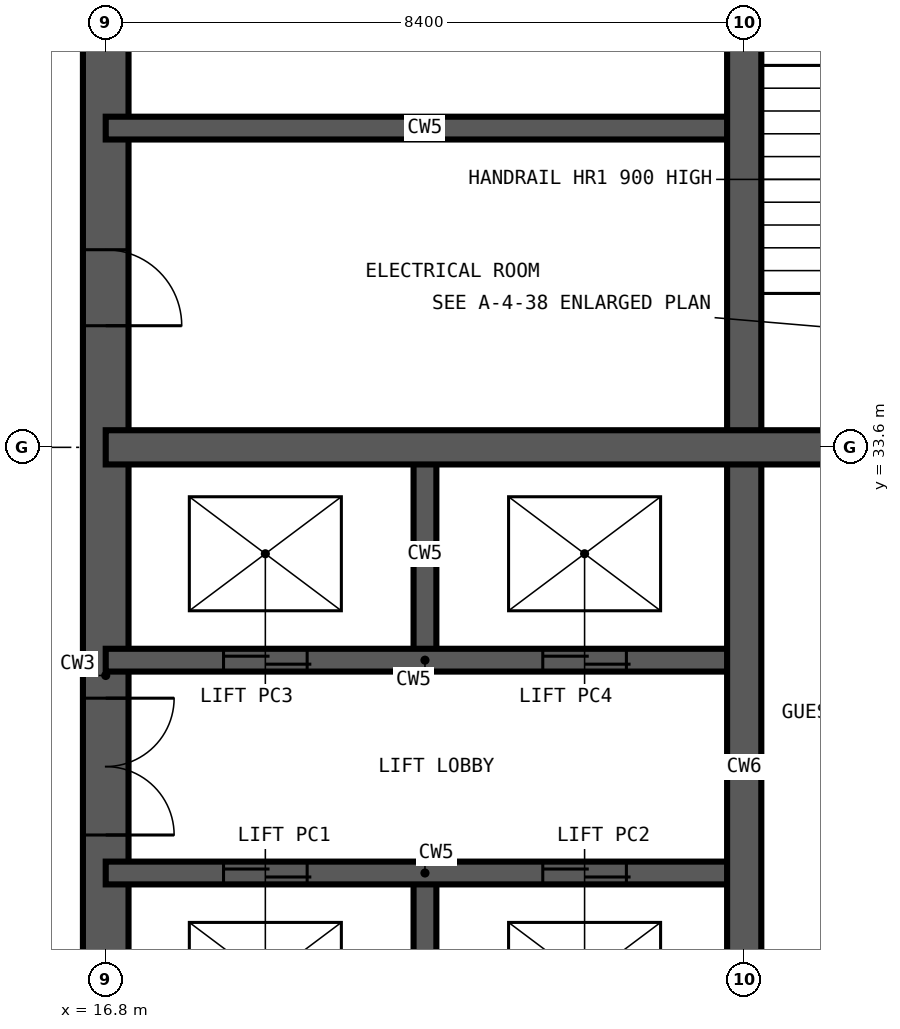
"""IFC4 building model, lengths in metres.
Left out: names, types, materials, properties, quantities, classifications, styles, units other than length and angle.
Written with IfcOpenShell. Run it as: python <this file> out.ifc"""

import sys

from ifc_helpers import new_model, si_unit, direction, frame, frame_2d, origin, place, context, subcontext, project, spatial, rectangle, extrude, element, fill, save


model = new_model("IFC4")
c1 = context("Model", 3, precision=1e-05, world=origin(), true_north=direction((0.0, 1.0)))
c2 = subcontext(c1, "Body", "Model", "MODEL_VIEW")
j1 = project(units=[si_unit("LENGTHUNIT", "METRE"), si_unit("PLANEANGLEUNIT", "RADIAN")], contexts=[c1])
p1 = place(None, origin())
s1 = spatial("IfcSite", under=j1, at=p1, CompositionType="ELEMENT")
p2 = place(p1, origin())
s2 = spatial("IfcBuilding", under=s1, at=p2, CompositionType="ELEMENT")
p3 = place(p2, frame((0.0, 0.0, 187.8)))
s3 = spatial("IfcBuildingStorey", under=s2, at=p3, CompositionType="ELEMENT", Elevation=187.8)
p4 = place(p3, frame((16.8, 41.7, -0.35), z_axis=(0.0, 0.0, 1.0), x_axis=(0.0, -1.0, 0.0)))
e1 = element("IfcWall", 1, at=p4, inside=s3, PredefinedType="SHEAR", context=c2, shape_type="SweptSolid", body=[
    extrude(rectangle(XDim=24.6, YDim=0.6, at=frame_2d((12.3, 0.0))), origin(), (0.0, 0.0, 1.0), 3.6),
])
p5 = place(p4, frame((11.4, 0.0, 0.35)))
e2 = element("IfcOpeningElement", 2, at=p5, cuts=e1, PredefinedType="OPENING", context=c2, shape_type="SweptSolid", body=[
    extrude(rectangle(XDim=1.8, YDim=2.2, at=frame_2d((0.9, 1.1))), frame((0.0, 0.31, 0.0), z_axis=(0.0, -1.0, 0.0), x_axis=(1.0, 0.0, 0.0)), (0.0, 0.0, 1.0), 0.62),
])
p6 = place(p4, frame((20.2, 0.0, 0.35)))
e3 = element("IfcOpeningElement", 3, at=p6, cuts=e1, PredefinedType="OPENING", context=c2, shape_type="SweptSolid", body=[
    extrude(rectangle(XDim=1.0, YDim=2.1, at=frame_2d((0.5, 1.05))), frame((0.0, 0.31, 0.0), z_axis=(0.0, -1.0, 0.0), x_axis=(1.0, 0.0, 0.0)), (0.0, 0.0, 1.0), 0.62),
])
p7 = place(p4, frame((5.5, 0.0, 0.35)))
e4 = element("IfcOpeningElement", 4, at=p7, cuts=e1, PredefinedType="OPENING", context=c2, shape_type="SweptSolid", body=[
    extrude(rectangle(XDim=1.0, YDim=2.1, at=frame_2d((0.5, 1.05))), frame((0.0, 0.31, 0.0), z_axis=(0.0, -1.0, 0.0), x_axis=(1.0, 0.0, 0.0)), (0.0, 0.0, 1.0), 0.62),
])
p8 = place(p3, frame((21.0, 22.4, -0.35), z_axis=(0.0, 0.0, 1.0), x_axis=(0.0, 1.0, 0.0)))
e5 = element("IfcWall", 5, at=p8, inside=s3, PredefinedType="SHEAR", context=c2, shape_type="SweptSolid", body=[
    extrude(rectangle(XDim=5.6, YDim=0.3, at=frame_2d((2.8, 0.0))), origin(), (0.0, 0.0, 1.0), 3.6),
])
p9 = place(p3, frame((21.0, 30.8, -0.35), z_axis=(0.0, 0.0, 1.0), x_axis=(0.0, 1.0, 0.0)))
e6 = element("IfcWall", 6, at=p9, inside=s3, PredefinedType="SHEAR", context=c2, shape_type="SweptSolid", body=[
    extrude(rectangle(XDim=2.8, YDim=0.3, at=frame_2d((1.4, 0.0))), origin(), (0.0, 0.0, 1.0), 3.6),
])
p10 = place(p3, frame((16.8, 28.0, -0.35), z_axis=(0.0, 0.0, 1.0), x_axis=(1.0, 0.0, 0.0)))
e7 = element("IfcWall", 7, at=p10, inside=s3, PredefinedType="SHEAR", context=c2, shape_type="SweptSolid", body=[
    extrude(rectangle(XDim=8.4, YDim=0.3, at=frame_2d((4.2, 0.0))), origin(), (0.0, 0.0, 1.0), 3.6),
])
p11 = place(p10, frame((1.55, 0.0, 0.35)))
e8 = element("IfcOpeningElement", 8, at=p11, cuts=e7, PredefinedType="OPENING", context=c2, shape_type="SweptSolid", body=[
    extrude(rectangle(XDim=1.1, YDim=2.2, at=frame_2d((0.55, 1.1))), frame((0.0, 0.16, 0.0), z_axis=(0.0, -1.0, 0.0), x_axis=(1.0, 0.0, 0.0)), (0.0, 0.0, 1.0), 0.32),
])
p12 = place(p10, frame((5.75, 0.0, 0.35)))
e9 = element("IfcOpeningElement", 9, at=p12, cuts=e7, PredefinedType="OPENING", context=c2, shape_type="SweptSolid", body=[
    extrude(rectangle(XDim=1.1, YDim=2.2, at=frame_2d((0.55, 1.1))), frame((0.0, 0.16, 0.0), z_axis=(0.0, -1.0, 0.0), x_axis=(1.0, 0.0, 0.0)), (0.0, 0.0, 1.0), 0.32),
])
p13 = place(p3, frame((16.8, 30.8, -0.35), z_axis=(0.0, 0.0, 1.0), x_axis=(1.0, 0.0, 0.0)))
e10 = element("IfcWall", 10, at=p13, inside=s3, PredefinedType="SHEAR", context=c2, shape_type="SweptSolid", body=[
    extrude(rectangle(XDim=8.4, YDim=0.3, at=frame_2d((4.2, 0.0))), origin(), (0.0, 0.0, 1.0), 3.6),
])
p14 = place(p13, frame((1.55, 0.0, 0.35)))
e11 = element("IfcOpeningElement", 11, at=p14, cuts=e10, PredefinedType="OPENING", context=c2, shape_type="SweptSolid", body=[
    extrude(rectangle(XDim=1.1, YDim=2.2, at=frame_2d((0.55, 1.1))), frame((0.0, 0.16, 0.0), z_axis=(0.0, -1.0, 0.0), x_axis=(1.0, 0.0, 0.0)), (0.0, 0.0, 1.0), 0.32),
])
p15 = place(p13, frame((5.75, 0.0, 0.35)))
e12 = element("IfcOpeningElement", 12, at=p15, cuts=e10, PredefinedType="OPENING", context=c2, shape_type="SweptSolid", body=[
    extrude(rectangle(XDim=1.1, YDim=2.2, at=frame_2d((0.55, 1.1))), frame((0.0, 0.16, 0.0), z_axis=(0.0, -1.0, 0.0), x_axis=(1.0, 0.0, 0.0)), (0.0, 0.0, 1.0), 0.32),
])
p16 = place(p3, frame((16.8, 37.8, -0.35), z_axis=(0.0, 0.0, 1.0), x_axis=(1.0, 0.0, 0.0)))
e13 = element("IfcWall", 13, at=p16, inside=s3, PredefinedType="SHEAR", context=c2, shape_type="SweptSolid", body=[
    extrude(rectangle(XDim=8.4, YDim=0.3, at=frame_2d((4.2, 0.0))), origin(), (0.0, 0.0, 1.0), 3.6),
])
for number, where, z_axis, x_axis in (
    (14, (25.2, 16.8, -0.35), (0.0, 0.0, 1.0), (0.0, 1.0, 0.0)),
    (15, (16.8, 33.6, -0.35), (0.0, 0.0, 1.0), (1.0, 0.0, 0.0)),
):
    element("IfcWall", number, at=place(p3, frame(where, z_axis=z_axis, x_axis=x_axis)), inside=s3, PredefinedType="SHEAR", context=c2, shape_type="SweptSolid", body=[
        extrude(rectangle(XDim=25.2, YDim=0.45, at=frame_2d((12.6, 0.0))), origin(), (0.0, 0.0, 1.0), 3.6),
    ])
p17 = place(p11, origin())
e16 = element("IfcDoor", 16, at=p17, inside=s3, OperationType="DOUBLE_DOOR_SLIDING", PredefinedType="DOOR", context=c2, shape_type="SweptSolid", body=[
    extrude(rectangle(XDim=1.1, YDim=2.2, at=frame_2d((0.55, 1.1))), frame((0.0, 0.025, 0.0), z_axis=(0.0, -1.0, 0.0), x_axis=(1.0, 0.0, 0.0)), (0.0, 0.0, 1.0), 0.05),
])
fill(e8, e16)
p18 = place(p12, origin())
e17 = element("IfcDoor", 17, at=p18, inside=s3, OperationType="DOUBLE_DOOR_SLIDING", PredefinedType="DOOR", context=c2, shape_type="SweptSolid", body=[
    extrude(rectangle(XDim=1.1, YDim=2.2, at=frame_2d((0.55, 1.1))), frame((0.0, 0.025, 0.0), z_axis=(0.0, -1.0, 0.0), x_axis=(1.0, 0.0, 0.0)), (0.0, 0.0, 1.0), 0.05),
])
fill(e9, e17)
p19 = place(p14, origin())
e18 = element("IfcDoor", 18, at=p19, inside=s3, OperationType="DOUBLE_DOOR_SLIDING", PredefinedType="DOOR", context=c2, shape_type="SweptSolid", body=[
    extrude(rectangle(XDim=1.1, YDim=2.2, at=frame_2d((0.55, 1.1))), frame((0.0, 0.025, 0.0), z_axis=(0.0, -1.0, 0.0), x_axis=(1.0, 0.0, 0.0)), (0.0, 0.0, 1.0), 0.05),
])
fill(e11, e18)
p20 = place(p15, origin())
e19 = element("IfcDoor", 19, at=p20, inside=s3, OperationType="DOUBLE_DOOR_SLIDING", PredefinedType="DOOR", context=c2, shape_type="SweptSolid", body=[
    extrude(rectangle(XDim=1.1, YDim=2.2, at=frame_2d((0.55, 1.1))), frame((0.0, 0.025, 0.0), z_axis=(0.0, -1.0, 0.0), x_axis=(1.0, 0.0, 0.0)), (0.0, 0.0, 1.0), 0.05),
])
fill(e12, e19)
p21 = place(p5, origin())
e20 = element("IfcDoor", 20, at=p21, inside=s3, OperationType="DOUBLE_DOOR_DOUBLE_SWING", PredefinedType="DOOR", context=c2, shape_type="SweptSolid", body=[
    extrude(rectangle(XDim=1.8, YDim=2.2, at=frame_2d((0.9, 1.1))), frame((0.0, 0.025, 0.0), z_axis=(0.0, -1.0, 0.0), x_axis=(1.0, 0.0, 0.0)), (0.0, 0.0, 1.0), 0.05),
])
fill(e2, e20)
p22 = place(p7, origin())
e21 = element("IfcDoor", 21, at=p22, inside=s3, OperationType="SINGLE_SWING_RIGHT", PredefinedType="DOOR", context=c2, shape_type="SweptSolid", body=[
    extrude(rectangle(XDim=1.0, YDim=2.1, at=frame_2d((0.5, 1.05))), frame((0.0, 0.025, 0.0), z_axis=(0.0, -1.0, 0.0), x_axis=(1.0, 0.0, 0.0)), (0.0, 0.0, 1.0), 0.05),
])
fill(e4, e21)
save(model, sys.argv[1])
